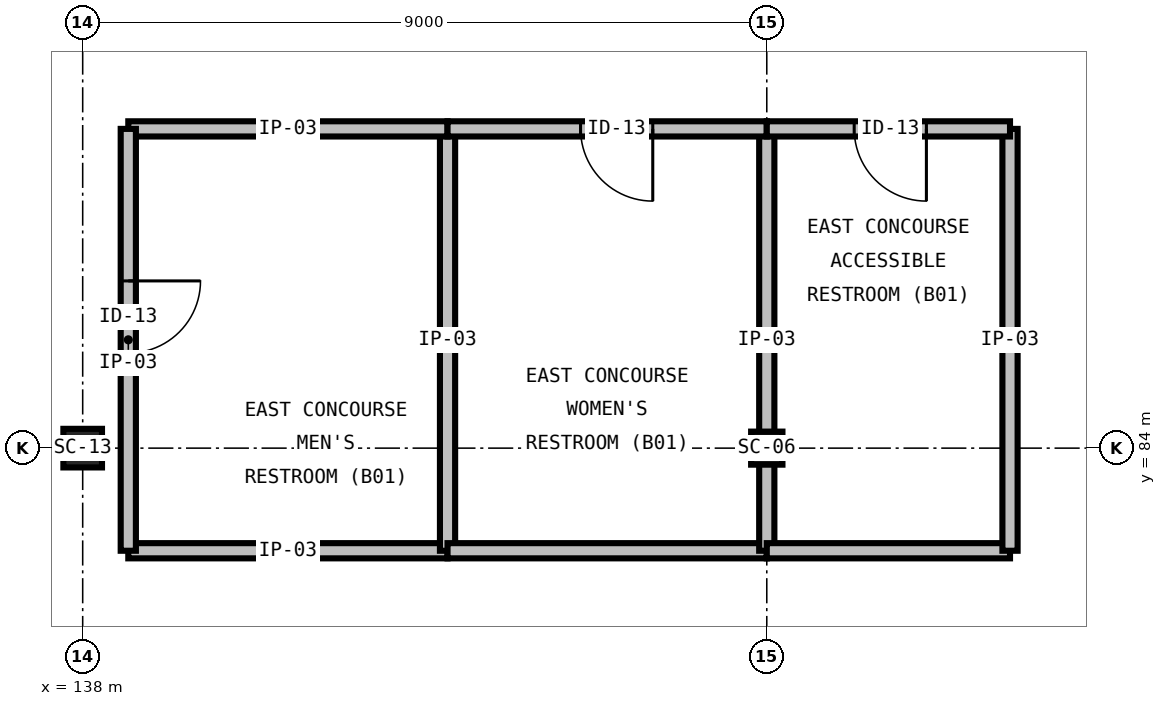
"""IFC4 building model, lengths in metres.
Left out: names, types, materials, properties, quantities, classifications, styles, units other than length and angle.
Written with IfcOpenShell. Run it as: python <this file> out.ifc"""

import sys

from ifc_helpers import new_model, si_unit, direction, frame, frame_2d, origin, origin_2d, place, context, subcontext, project, spatial, rectangle, hollow_rectangle, i_section, extrude, element, fill, save


model = new_model("IFC4")
c1 = context("Model", 3, precision=1e-05, world=origin(), true_north=direction((0.0, 1.0)))
c2 = subcontext(c1, "Body", "Model", "MODEL_VIEW")
j1 = project(units=[si_unit("LENGTHUNIT", "METRE"), si_unit("PLANEANGLEUNIT", "RADIAN")], contexts=[c1])
p1 = place(None, origin())
s1 = spatial("IfcSite", under=j1, at=p1, CompositionType="ELEMENT")
p2 = place(p1, origin())
s2 = spatial("IfcBuilding", under=s1, at=p2, CompositionType="ELEMENT")
p3 = place(p2, frame((0.0, 0.0, -5.4)))
s3 = spatial("IfcBuildingStorey", under=s2, at=p3, CompositionType="ELEMENT", Elevation=-5.4)
p4 = place(p3, frame((138.0, 84.0, 0.0), z_axis=(0.0, 0.0, 1.0), x_axis=(1.0, 0.0, 0.0)))
e1 = element("IfcColumn", 1, at=p4, inside=s3, PredefinedType="COLUMN", context=c2, shape_type="SweptSolid", body=[
    extrude(hollow_rectangle(XDim=0.508, YDim=0.508, WallThickness=0.015, at=origin_2d()), origin(), (0.0, 0.0, 1.0), 5.4),
])
p5 = place(p3, frame((147.0, 84.0, 0.0), z_axis=(0.0, 0.0, 1.0), x_axis=(1.0, 0.0, 0.0)))
e2 = element("IfcColumn", 2, at=p5, inside=s3, PredefinedType="COLUMN", context=c2, shape_type="SweptSolid", body=[
    extrude(i_section(OverallWidth=0.412, OverallDepth=0.435, WebThickness=0.036, FlangeThickness=0.057, FilletRadius=0.031, at=origin_2d()), origin(), (0.0, 0.0, 1.0), 5.4),
])
p6 = place(p3, frame((138.6, 82.65, 0.0), z_axis=(0.0, 0.0, 1.0), x_axis=(1.0, 0.0, 0.0)))
e3 = element("IfcWall", 3, at=p6, inside=s3, PredefinedType="PARTITIONING", context=c2, shape_type="SweptSolid", body=[
    extrude(rectangle(XDim=4.2, YDim=0.2, at=frame_2d((2.1, 0.0))), origin(), (0.0, 0.0, 1.0), 4.96),
])
p7 = place(p3, frame((142.8, 82.65, 0.0), z_axis=(0.0, 0.0, 1.0), x_axis=(0.0, 1.0, 0.0)))
e4 = element("IfcWall", 4, at=p7, inside=s3, PredefinedType="PARTITIONING", context=c2, shape_type="SweptSolid", body=[
    extrude(rectangle(XDim=5.55, YDim=0.2, at=frame_2d((2.775, 0.0))), origin(), (0.0, 0.0, 1.0), 4.96),
])
p8 = place(p3, frame((142.8, 88.2, 0.0), z_axis=(0.0, 0.0, 1.0), x_axis=(-1.0, 0.0, 0.0)))
e5 = element("IfcWall", 5, at=p8, inside=s3, PredefinedType="PARTITIONING", context=c2, shape_type="SweptSolid", body=[
    extrude(rectangle(XDim=4.2, YDim=0.2, at=frame_2d((2.1, 0.0))), origin(), (0.0, 0.0, 1.0), 4.96),
])
p9 = place(p3, frame((138.6, 88.2, 0.0), z_axis=(0.0, 0.0, 1.0), x_axis=(0.0, -1.0, 0.0)))
e6 = element("IfcWall", 6, at=p9, inside=s3, PredefinedType="PARTITIONING", context=c2, shape_type="SweptSolid", body=[
    extrude(rectangle(XDim=5.55, YDim=0.2, at=frame_2d((2.775, 0.0))), origin(), (0.0, 0.0, 1.0), 4.96),
])
p10 = place(p9, frame((2.0, 0.0, 0.0)))
e7 = element("IfcOpeningElement", 7, at=p10, cuts=e6, PredefinedType="OPENING", context=c2, shape_type="SweptSolid", body=[
    extrude(rectangle(XDim=0.95, YDim=2.15, at=frame_2d((0.475, 1.075))), frame((0.0, 0.115, 0.0), z_axis=(0.0, -1.0, 0.0), x_axis=(1.0, 0.0, 0.0)), (0.0, 0.0, 1.0), 0.23),
])
p11 = place(p3, frame((142.8, 82.65, 0.0), z_axis=(0.0, 0.0, 1.0), x_axis=(1.0, 0.0, 0.0)))
e8 = element("IfcWall", 8, at=p11, inside=s3, PredefinedType="PARTITIONING", context=c2, shape_type="SweptSolid", body=[
    extrude(rectangle(XDim=4.2, YDim=0.2, at=frame_2d((2.1, 0.0))), origin(), (0.0, 0.0, 1.0), 4.96),
])
p12 = place(p3, frame((147.0, 82.65, 0.0), z_axis=(0.0, 0.0, 1.0), x_axis=(0.0, 1.0, 0.0)))
e9 = element("IfcWall", 9, at=p12, inside=s3, PredefinedType="PARTITIONING", context=c2, shape_type="SweptSolid", body=[
    extrude(rectangle(XDim=5.55, YDim=0.2, at=frame_2d((2.775, 0.0))), origin(), (0.0, 0.0, 1.0), 4.17),
])
p13 = place(p3, frame((147.0, 88.2, 0.0), z_axis=(0.0, 0.0, 1.0), x_axis=(-1.0, 0.0, 0.0)))
e10 = element("IfcWall", 10, at=p13, inside=s3, PredefinedType="PARTITIONING", context=c2, shape_type="SweptSolid", body=[
    extrude(rectangle(XDim=4.2, YDim=0.2, at=frame_2d((2.1, 0.0))), origin(), (0.0, 0.0, 1.0), 4.96),
])
p14 = place(p13, frame((1.5, 0.0, 0.0)))
e11 = element("IfcOpeningElement", 11, at=p14, cuts=e10, PredefinedType="OPENING", context=c2, shape_type="SweptSolid", body=[
    extrude(rectangle(XDim=0.95, YDim=2.15, at=frame_2d((0.475, 1.075))), frame((0.0, 0.115, 0.0), z_axis=(0.0, -1.0, 0.0), x_axis=(1.0, 0.0, 0.0)), (0.0, 0.0, 1.0), 0.23),
])
p15 = place(p3, frame((147.0, 82.65, 0.0), z_axis=(0.0, 0.0, 1.0), x_axis=(1.0, 0.0, 0.0)))
e12 = element("IfcWall", 12, at=p15, inside=s3, PredefinedType="PARTITIONING", context=c2, shape_type="SweptSolid", body=[
    extrude(rectangle(XDim=3.2, YDim=0.2, at=frame_2d((1.6, 0.0))), origin(), (0.0, 0.0, 1.0), 4.96),
])
p16 = place(p3, frame((150.2, 82.65, 0.0), z_axis=(0.0, 0.0, 1.0), x_axis=(0.0, 1.0, 0.0)))
e13 = element("IfcWall", 13, at=p16, inside=s3, PredefinedType="PARTITIONING", context=c2, shape_type="SweptSolid", body=[
    extrude(rectangle(XDim=5.55, YDim=0.2, at=frame_2d((2.775, 0.0))), origin(), (0.0, 0.0, 1.0), 4.96),
])
p17 = place(p3, frame((150.2, 88.2, 0.0), z_axis=(0.0, 0.0, 1.0), x_axis=(-1.0, 0.0, 0.0)))
e14 = element("IfcWall", 14, at=p17, inside=s3, PredefinedType="PARTITIONING", context=c2, shape_type="SweptSolid", body=[
    extrude(rectangle(XDim=3.2, YDim=0.2, at=frame_2d((1.6, 0.0))), origin(), (0.0, 0.0, 1.0), 4.96),
])
p18 = place(p17, frame((1.1, 0.0, 0.0)))
e15 = element("IfcOpeningElement", 15, at=p18, cuts=e14, PredefinedType="OPENING", context=c2, shape_type="SweptSolid", body=[
    extrude(rectangle(XDim=0.95, YDim=2.15, at=frame_2d((0.475, 1.075))), frame((0.0, 0.115, 0.0), z_axis=(0.0, -1.0, 0.0), x_axis=(1.0, 0.0, 0.0)), (0.0, 0.0, 1.0), 0.23),
])
p19 = place(p10, origin())
e16 = element("IfcDoor", 16, at=p19, inside=s3, OperationType="SINGLE_SWING_LEFT", PredefinedType="DOOR", context=c2, shape_type="SweptSolid", body=[
    extrude(rectangle(XDim=0.95, YDim=2.15, at=frame_2d((0.475, 1.075))), frame((0.0, 0.025, 0.0), z_axis=(0.0, -1.0, 0.0), x_axis=(1.0, 0.0, 0.0)), (0.0, 0.0, 1.0), 0.05),
])
fill(e7, e16)
p20 = place(p14, origin())
e17 = element("IfcDoor", 17, at=p20, inside=s3, OperationType="SINGLE_SWING_LEFT", PredefinedType="DOOR", context=c2, shape_type="SweptSolid", body=[
    extrude(rectangle(XDim=0.95, YDim=2.15, at=frame_2d((0.475, 1.075))), frame((0.0, 0.025, 0.0), z_axis=(0.0, -1.0, 0.0), x_axis=(1.0, 0.0, 0.0)), (0.0, 0.0, 1.0), 0.05),
])
fill(e11, e17)
p21 = place(p18, origin())
e18 = element("IfcDoor", 18, at=p21, inside=s3, OperationType="SINGLE_SWING_LEFT", PredefinedType="DOOR", context=c2, shape_type="SweptSolid", body=[
    extrude(rectangle(XDim=0.95, YDim=2.15, at=frame_2d((0.475, 1.075))), frame((0.0, 0.025, 0.0), z_axis=(0.0, -1.0, 0.0), x_axis=(1.0, 0.0, 0.0)), (0.0, 0.0, 1.0), 0.05),
])
fill(e15, e18)
save(model, sys.argv[1])
